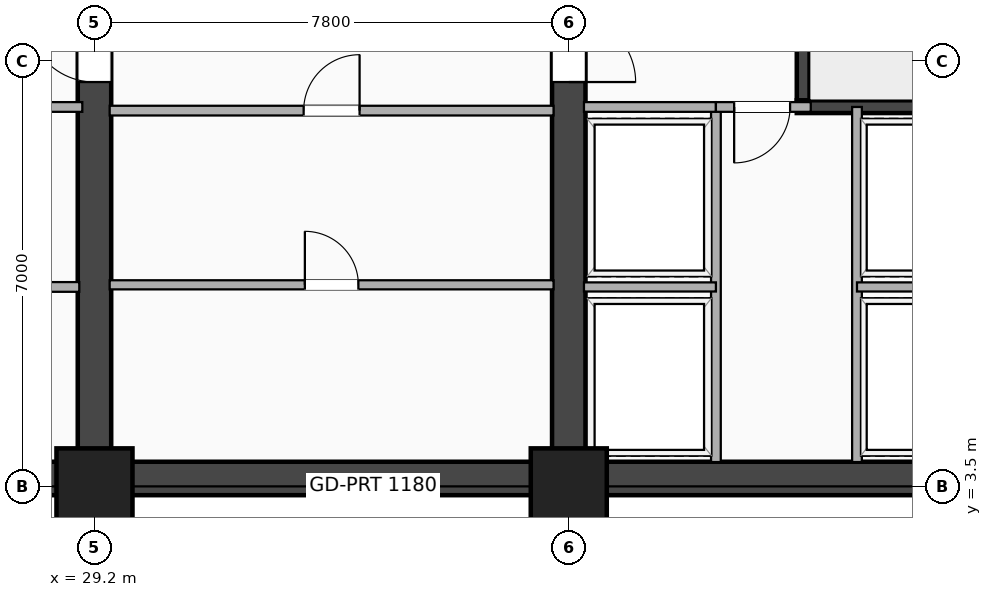
"""IFC4 building model, lengths in metres.
Left out: names, types, materials, properties, quantities, classifications, styles, units other than length and angle.
Written with IfcOpenShell. Run it as: python <this file> out.ifc"""

import sys

from ifc_helpers import new_model, si_unit, direction, frame, frame_2d, origin, origin_2d, place, context, subcontext, project, spatial, rectangle, extrude, element, fill, save


model = new_model("IFC4")
c1 = context("Model", 3, precision=1e-05, world=origin(), true_north=direction((0.0, 1.0)))
c2 = subcontext(c1, "Body", "Model", "MODEL_VIEW")
j1 = project(units=[si_unit("LENGTHUNIT", "METRE"), si_unit("PLANEANGLEUNIT", "RADIAN")], contexts=[c1])
p1 = place(None, origin())
s1 = spatial("IfcSite", under=j1, at=p1, CompositionType="ELEMENT")
p2 = place(p1, origin())
s2 = spatial("IfcBuilding", under=s1, at=p2, CompositionType="ELEMENT")
p3 = place(p2, frame((0.0, 0.0, 130.2)))
s3 = spatial("IfcBuildingStorey", under=s2, at=p3, CompositionType="ELEMENT", Elevation=130.2)
p4 = place(p3, frame((20.3, 3.63, 0.0), z_axis=(0.0, 0.0, 1.0), x_axis=(1.0, 0.0, 0.0)))
e1 = element("IfcWall", 1, at=p4, inside=s3, PredefinedType="SHEAR", context=c2, shape_type="SweptSolid", body=[
    extrude(rectangle(XDim=24.5, YDim=0.55, at=frame_2d((12.25, 0.0))), origin(), (0.0, 0.0, 1.0), 8.15),
])
p5 = place(p3, frame((29.2, 3.5, 0.0), z_axis=(0.0, 0.0, 1.0), x_axis=(0.0, 1.0, 0.0)))
e2 = element("IfcWall", 2, at=p5, inside=s3, PredefinedType="SHEAR", context=c2, shape_type="SweptSolid", body=[
    extrude(rectangle(XDim=16.9, YDim=0.55, at=frame_2d((8.45, 0.0))), origin(), (0.0, 0.0, 1.0), 8.15),
])
p6 = place(p5, frame((7.75, 0.0, 0.0), z_axis=(0.0, 0.0, 1.0), x_axis=(-1.0, 0.0, 0.0)))
e3 = element("IfcOpeningElement", 3, at=p6, cuts=e2, PredefinedType="OPENING", context=c2, shape_type="SweptSolid", body=[
    extrude(rectangle(XDim=1.1, YDim=2.15, at=frame_2d((0.55, 1.075))), frame((0.0, 0.285, 0.0), z_axis=(0.0, -1.0, 0.0), x_axis=(1.0, 0.0, 0.0)), (0.0, 0.0, 1.0), 0.57),
])
p7 = place(p3, frame((37.0, 3.5, 0.0), z_axis=(0.0, 0.0, 1.0), x_axis=(0.0, 1.0, 0.0)))
e4 = element("IfcWall", 4, at=p7, inside=s3, PredefinedType="SHEAR", context=c2, shape_type="SweptSolid", body=[
    extrude(rectangle(XDim=16.9, YDim=0.55, at=frame_2d((8.45, 0.0))), origin(), (0.0, 0.0, 1.0), 8.15),
])
p8 = place(p7, frame((6.65, 0.0, 0.0)))
e5 = element("IfcOpeningElement", 5, at=p8, cuts=e4, PredefinedType="OPENING", context=c2, shape_type="SweptSolid", body=[
    extrude(rectangle(XDim=1.1, YDim=2.15, at=frame_2d((0.55, 1.075))), frame((0.0, 0.285, 0.0), z_axis=(0.0, -1.0, 0.0), x_axis=(1.0, 0.0, 0.0)), (0.0, 0.0, 1.0), 0.57),
])
p9 = place(p3, frame((40.855, 9.745, 0.0), z_axis=(0.0, 0.0, 1.0), x_axis=(0.0, 1.0, 0.0)))
e6 = element("IfcWall", 6, at=p9, inside=s3, PredefinedType="SHEAR", context=c2, shape_type="SweptSolid", body=[
    extrude(rectangle(XDim=8.01, YDim=0.21, at=frame_2d((4.005, 0.0))), origin(), (0.0, 0.0, 1.0), 8.15),
])
p10 = place(p3, frame((40.75, 9.745, 0.0), z_axis=(0.0, 0.0, 1.0), x_axis=(1.0, 0.0, 0.0)))
e7 = element("IfcWall", 7, at=p10, inside=s3, PredefinedType="SHEAR", context=c2, shape_type="SweptSolid", body=[
    extrude(rectangle(XDim=3.66, YDim=0.21, at=frame_2d((1.83, 0.0))), origin(), (0.0, 0.0, 1.0), 8.15),
])
for number, where, z_axis, x_axis in (
    (8, (29.2, 3.5, -0.32), (0.0, 0.0, 1.0), (1.0, 0.0, 0.0)),
    (9, (37.0, 3.5, -0.32), (0.0, 0.0, 1.0), (1.0, 0.0, 0.0)),
):
    element("IfcColumn", number, at=place(p3, frame(where, z_axis=z_axis, x_axis=x_axis)), inside=s3, PredefinedType="COLUMN", context=c2, shape_type="SweptSolid", body=[
        extrude(rectangle(XDim=1.25, YDim=1.25, at=origin_2d()), origin(), (0.0, 0.0, 1.0), 8.47),
    ])
p11 = place(p3, frame((20.65, 6.78, 0.0), z_axis=(0.0, 0.0, 1.0), x_axis=(1.0, 0.0, 0.0)))
e10 = element("IfcWall", 10, at=p11, inside=s3, PredefinedType="PARTITIONING", context=c2, shape_type="SweptSolid", body=[
    extrude(rectangle(XDim=8.3, YDim=0.16, at=frame_2d((4.15, 0.0))), origin(), (0.0, 0.0, 1.0), 7.223),
])
p12 = place(p3, frame((24.2, 9.74, 0.0), z_axis=(0.0, 0.0, 1.0), x_axis=(1.0, 0.0, 0.0)))
e11 = element("IfcWall", 11, at=p12, inside=s3, PredefinedType="PARTITIONING", context=c2, shape_type="SweptSolid", body=[
    extrude(rectangle(XDim=4.8, YDim=0.16, at=frame_2d((2.4, 0.0))), origin(), (0.0, 0.0, 1.0), 8.15),
])
p13 = place(p12, frame((1.85, 0.0, 0.0)))
e12 = element("IfcOpeningElement", 12, at=p13, cuts=e11, PredefinedType="OPENING", context=c2, shape_type="SweptSolid", body=[
    extrude(rectangle(XDim=1.1, YDim=2.15, at=frame_2d((0.55, 1.075))), frame((0.0, 0.09, 0.0), z_axis=(0.0, -1.0, 0.0), x_axis=(1.0, 0.0, 0.0)), (0.0, 0.0, 1.0), 0.18),
])
for number, where, z_axis, x_axis in (
    (13, (39.42, 3.9, 0.0), (0.0, 0.0, 1.0), (0.0, 1.0, 0.0)),
    (14, (41.74, 3.9, 0.0), (0.0, 0.0, 1.0), (0.0, 1.0, 0.0)),
):
    element("IfcWall", number, at=place(p3, frame(where, z_axis=z_axis, x_axis=x_axis)), inside=s3, PredefinedType="PARTITIONING", context=c2, shape_type="SweptSolid", body=[
        extrude(rectangle(XDim=5.84, YDim=0.16, at=frame_2d((2.92, 0.0))), origin(), (0.0, 0.0, 1.0), 8.15),
    ])
p14 = place(p3, frame((37.25, 6.78, 0.0), z_axis=(0.0, 0.0, 1.0), x_axis=(1.0, 0.0, 0.0)))
e15 = element("IfcWall", 15, at=p14, inside=s3, PredefinedType="PARTITIONING", context=c2, shape_type="SweptSolid", body=[
    extrude(rectangle(XDim=2.17, YDim=0.15, at=frame_2d((1.085, 0.0))), origin(), (0.0, 0.0, 1.0), 8.15),
])
p15 = place(p3, frame((41.74, 6.78, 0.0), z_axis=(0.0, 0.0, 1.0), x_axis=(1.0, 0.0, 0.0)))
e16 = element("IfcWall", 16, at=p15, inside=s3, PredefinedType="PARTITIONING", context=c2, shape_type="SweptSolid", body=[
    extrude(rectangle(XDim=2.66, YDim=0.15, at=frame_2d((1.33, 0.0))), origin(), (0.0, 0.0, 1.0), 6.455),
])
p16 = place(p3, frame((37.25, 9.74, 0.0), z_axis=(0.0, 0.0, 1.0), x_axis=(1.0, 0.0, 0.0)))
e17 = element("IfcWall", 17, at=p16, inside=s3, PredefinedType="PARTITIONING", context=c2, shape_type="SweptSolid", body=[
    extrude(rectangle(XDim=2.17, YDim=0.16, at=frame_2d((1.085, 0.0))), origin(), (0.0, 0.0, 1.0), 8.15),
])
p17 = place(p3, frame((39.42, 9.74, 0.0), z_axis=(0.0, 0.0, 1.0), x_axis=(1.0, 0.0, 0.0)))
e18 = element("IfcWall", 18, at=p17, inside=s3, PredefinedType="PARTITIONING", context=c2, shape_type="SweptSolid", body=[
    extrude(rectangle(XDim=1.56, YDim=0.16, at=frame_2d((0.78, 0.0))), origin(), (0.0, 0.0, 1.0), 8.15),
])
p18 = place(p17, frame((0.3, 0.0, 0.0)))
e19 = element("IfcOpeningElement", 19, at=p18, cuts=e18, PredefinedType="OPENING", context=c2, shape_type="SweptSolid", body=[
    extrude(rectangle(XDim=0.92, YDim=2.08, at=frame_2d((0.46, 1.04))), frame((0.0, 0.09, 0.0), z_axis=(0.0, -1.0, 0.0), x_axis=(1.0, 0.0, 0.0)), (0.0, 0.0, 1.0), 0.18),
])
p19 = place(p3, frame((29.45, 9.68, 0.0), z_axis=(0.0, 0.0, 1.0), x_axis=(1.0, 0.0, 0.0)))
e20 = element("IfcWall", 20, at=p19, inside=s3, PredefinedType="PARTITIONING", context=c2, shape_type="SweptSolid", body=[
    extrude(rectangle(XDim=7.3, YDim=0.16, at=frame_2d((3.65, 0.0))), origin(), (0.0, 0.0, 1.0), 8.15),
])
p20 = place(p19, frame((4.11, 0.0, 0.0), z_axis=(0.0, 0.0, 1.0), x_axis=(-1.0, 0.0, 0.0)))
e21 = element("IfcOpeningElement", 21, at=p20, cuts=e20, PredefinedType="OPENING", context=c2, shape_type="SweptSolid", body=[
    extrude(rectangle(XDim=0.92, YDim=2.08, at=frame_2d((0.46, 1.04))), frame((0.0, 0.09, 0.0), z_axis=(0.0, -1.0, 0.0), x_axis=(1.0, 0.0, 0.0)), (0.0, 0.0, 1.0), 0.18),
])
p21 = place(p3, frame((29.45, 6.815, 0.0), z_axis=(0.0, 0.0, 1.0), x_axis=(1.0, 0.0, 0.0)))
e22 = element("IfcWall", 22, at=p21, inside=s3, PredefinedType="PARTITIONING", context=c2, shape_type="SweptSolid", body=[
    extrude(rectangle(XDim=7.3, YDim=0.15, at=frame_2d((3.65, 0.0))), origin(), (0.0, 0.0, 1.0), 8.15),
])
p22 = place(p21, frame((4.09, 0.0, 0.0), z_axis=(0.0, 0.0, 1.0), x_axis=(-1.0, 0.0, 0.0)))
e23 = element("IfcOpeningElement", 23, at=p22, cuts=e22, PredefinedType="OPENING", context=c2, shape_type="SweptSolid", body=[
    extrude(rectangle(XDim=0.88, YDim=2.08, at=frame_2d((0.44, 1.04))), frame((0.0, 0.085, 0.0), z_axis=(0.0, -1.0, 0.0), x_axis=(1.0, 0.0, 0.0)), (0.0, 0.0, 1.0), 0.17),
])
p23 = place(p6, origin())
e24 = element("IfcDoor", 24, at=p23, inside=s3, OperationType="SINGLE_SWING_RIGHT", PredefinedType="DOOR", context=c2, shape_type="SweptSolid", body=[
    extrude(rectangle(XDim=1.1, YDim=2.15, at=frame_2d((0.55, 1.075))), frame((0.0, 0.025, 0.0), z_axis=(0.0, -1.0, 0.0), x_axis=(1.0, 0.0, 0.0)), (0.0, 0.0, 1.0), 0.05),
])
fill(e3, e24)
p24 = place(p8, origin())
e25 = element("IfcDoor", 25, at=p24, inside=s3, OperationType="SINGLE_SWING_LEFT", PredefinedType="DOOR", context=c2, shape_type="SweptSolid", body=[
    extrude(rectangle(XDim=1.1, YDim=2.15, at=frame_2d((0.55, 1.075))), frame((0.0, 0.025, 0.0), z_axis=(0.0, -1.0, 0.0), x_axis=(1.0, 0.0, 0.0)), (0.0, 0.0, 1.0), 0.05),
])
fill(e5, e25)
p25 = place(p18, origin())
e26 = element("IfcDoor", 26, at=p25, inside=s3, OperationType="SINGLE_SWING_LEFT", PredefinedType="DOOR", context=c2, shape_type="SweptSolid", body=[
    extrude(rectangle(XDim=0.92, YDim=2.08, at=frame_2d((0.46, 1.04))), frame((0.0, 0.025, 0.0), z_axis=(0.0, -1.0, 0.0), x_axis=(1.0, 0.0, 0.0)), (0.0, 0.0, 1.0), 0.05),
])
fill(e19, e26)
p26 = place(p20, origin())
e27 = element("IfcDoor", 27, at=p26, inside=s3, OperationType="SINGLE_SWING_RIGHT", PredefinedType="DOOR", context=c2, shape_type="SweptSolid", body=[
    extrude(rectangle(XDim=0.92, YDim=2.08, at=frame_2d((0.46, 1.04))), frame((0.0, 0.025, 0.0), z_axis=(0.0, -1.0, 0.0), x_axis=(1.0, 0.0, 0.0)), (0.0, 0.0, 1.0), 0.05),
])
fill(e21, e27)
p27 = place(p22, origin())
e28 = element("IfcDoor", 28, at=p27, inside=s3, OperationType="SINGLE_SWING_LEFT", PredefinedType="DOOR", context=c2, shape_type="SweptSolid", body=[
    extrude(rectangle(XDim=0.88, YDim=2.08, at=frame_2d((0.44, 1.04))), frame((0.0, 0.025, 0.0), z_axis=(0.0, -1.0, 0.0), x_axis=(1.0, 0.0, 0.0)), (0.0, 0.0, 1.0), 0.05),
])
fill(e23, e28)
save(model, sys.argv[1])
